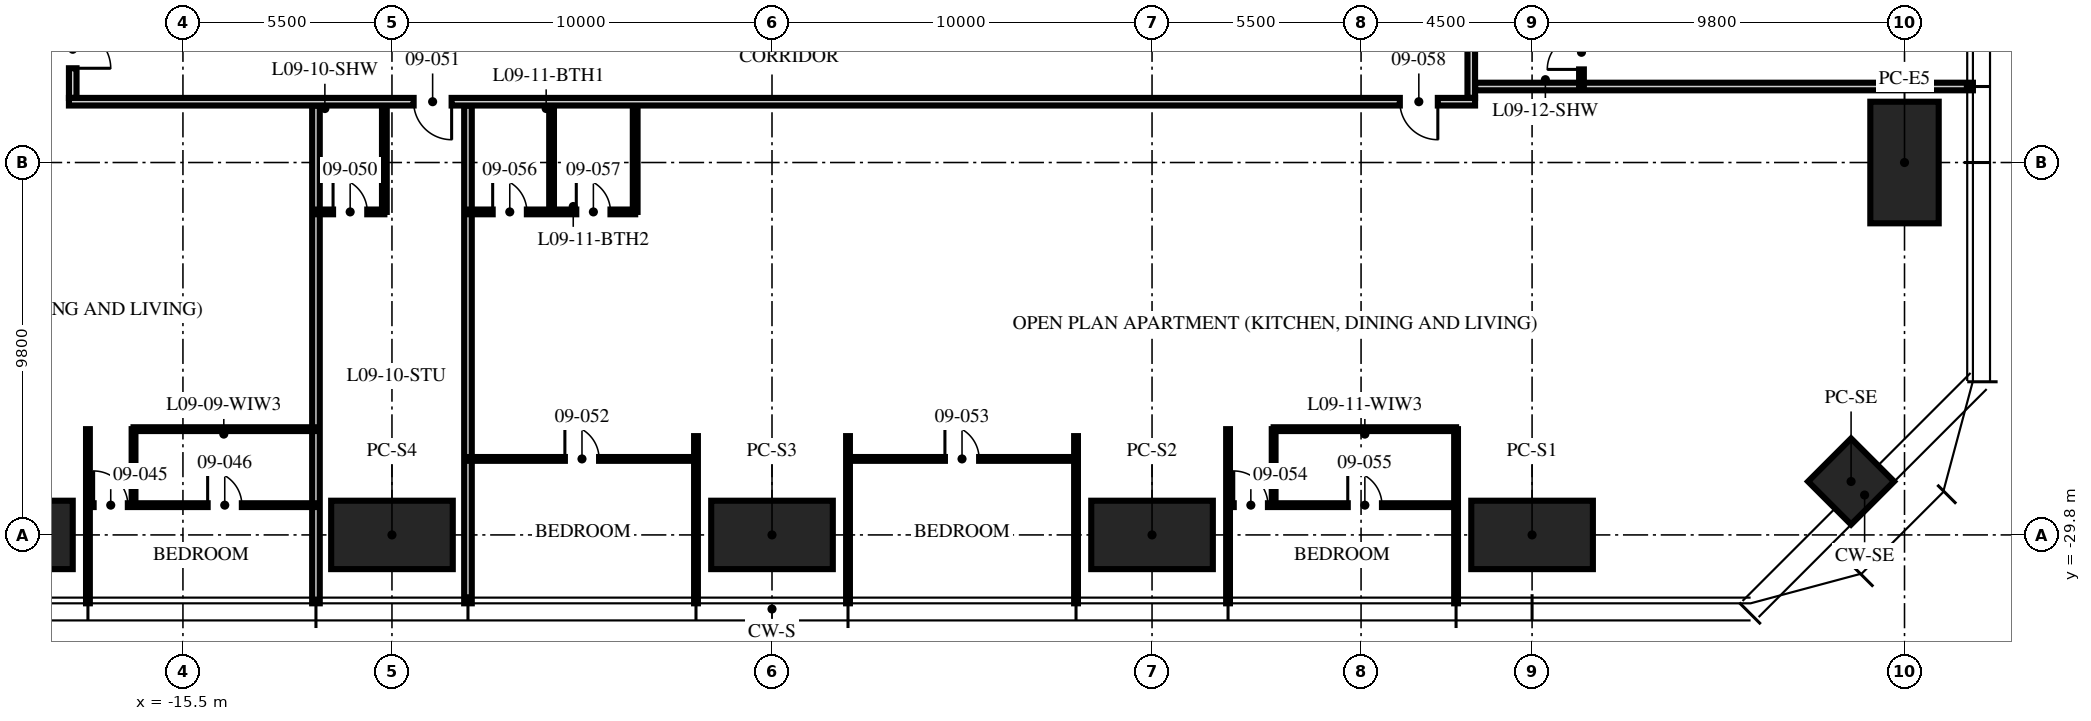
"""IFC4 building model, lengths in metres.
Left out: names, types, materials, properties, quantities, classifications, styles, units other than length and angle.
Written with IfcOpenShell. Run it as: python <this file> out.ifc"""

import sys

from ifc_helpers import new_model, si_unit, direction, frame, frame_2d, origin, origin_2d, place, context, subcontext, project, spatial, rectangle, hollow_rectangle, extrude, element, fill, save


model = new_model("IFC4")
c1 = context("Model", 3, precision=1e-05, world=origin(), true_north=direction((0.0, 1.0)))
c2 = subcontext(c1, "Body", "Model", "MODEL_VIEW")
j1 = project(units=[si_unit("LENGTHUNIT", "METRE"), si_unit("PLANEANGLEUNIT", "RADIAN")], contexts=[c1])
p1 = place(None, origin())
s1 = spatial("IfcSite", under=j1, at=p1, CompositionType="ELEMENT")
p2 = place(p1, origin())
s2 = spatial("IfcBuilding", under=s1, at=p2, CompositionType="ELEMENT")
p3 = place(p2, frame((0.0, 0.0, 39.75)))
s3 = spatial("IfcBuildingStorey", under=s2, at=p3, CompositionType="ELEMENT", Elevation=39.75)
for number, where, z_axis, x_axis in (
    (1, (29.8, -20.0, 0.0), (0.0, 0.0, 1.0), (0.0, 1.0, 0.0)),
    (2, (20.0, -29.8, 0.0), (0.0, 0.0, 1.0), (1.0, 0.0, 0.0)),
    (3, (10.0, -29.8, 0.0), (0.0, 0.0, 1.0), (1.0, 0.0, 0.0)),
    (4, (0.0, -29.8, 0.0), (0.0, 0.0, 1.0), (1.0, 0.0, 0.0)),
    (5, (-10.0, -29.8, 0.0), (0.0, 0.0, 1.0), (1.0, 0.0, 0.0)),
    (6, (-20.0, -29.8, 0.0), (0.0, 0.0, 1.0), (1.0, 0.0, 0.0)),
):
    element("IfcColumn", number, at=place(p3, frame(where, z_axis=z_axis, x_axis=x_axis)), inside=s3, PredefinedType="COLUMN", context=c2, shape_type="SweptSolid", body=[
        extrude(hollow_rectangle(XDim=3.2, YDim=1.8, WallThickness=0.2, at=origin_2d()), origin(), (0.0, 0.0, 1.0), 3.75),
    ])
p4 = place(p3, frame((28.394, -28.394, 0.0), z_axis=(0.0, 0.0, 1.0), x_axis=(0.707106781187, 0.707106781187, 0.0)))
e7 = element("IfcColumn", 7, at=p4, inside=s3, PredefinedType="COLUMN", context=c2, shape_type="SweptSolid", body=[
    extrude(hollow_rectangle(XDim=1.6, YDim=1.6, WallThickness=0.1, at=origin_2d()), origin(), (0.0, 0.0, 1.0), 3.75),
])
p5 = place(p3, frame((-18.0, -27.017, 0.0), z_axis=(0.0, 0.0, 1.0), x_axis=(0.0, -1.0, 0.0)))
e8 = element("IfcWall", 8, at=p5, inside=s3, PredefinedType="PARTITIONING", context=c2, shape_type="SweptSolid", body=[
    extrude(rectangle(XDim=4.583, YDim=0.1, at=frame_2d((2.292, 0.0))), origin(), (0.0, 0.0, 1.0), 2.71),
])
for number, where, z_axis, x_axis in (
    (9, (-12.0, -18.5, 0.0), (0.0, 0.0, 1.0), (0.0, -1.0, 0.0)),
    (10, (-8.0, -18.5, 0.0), (0.0, 0.0, 1.0), (0.0, -1.0, 0.0)),
):
    element("IfcWall", number, at=place(p3, frame(where, z_axis=z_axis, x_axis=x_axis)), inside=s3, PredefinedType="PARTITIONING", context=c2, shape_type="SweptSolid", body=[
        extrude(rectangle(XDim=13.1, YDim=0.2, at=frame_2d((6.55, 0.0))), origin(), (0.0, 0.0, 1.0), 2.71),
    ])
for number, where, z_axis, x_axis in (
    (11, (-2.0, -27.2, 0.0), (0.0, 0.0, 1.0), (0.0, -1.0, 0.0)),
    (12, (2.0, -27.2, 0.0), (0.0, 0.0, 1.0), (0.0, -1.0, 0.0)),
    (13, (8.0, -27.2, 0.0), (0.0, 0.0, 1.0), (0.0, -1.0, 0.0)),
):
    element("IfcWall", number, at=place(p3, frame(where, z_axis=z_axis, x_axis=x_axis)), inside=s3, PredefinedType="PARTITIONING", context=c2, shape_type="SweptSolid", body=[
        extrude(rectangle(XDim=4.4, YDim=0.1, at=frame_2d((2.2, 0.0))), origin(), (0.0, 0.0, 1.0), 2.71),
    ])
for number, where, z_axis, x_axis in (
    (14, (12.0, -27.017, 0.0), (0.0, 0.0, 1.0), (0.0, -1.0, 0.0)),
    (15, (18.0, -27.017, 0.0), (0.0, 0.0, 1.0), (0.0, -1.0, 0.0)),
):
    element("IfcWall", number, at=place(p3, frame(where, z_axis=z_axis, x_axis=x_axis)), inside=s3, PredefinedType="PARTITIONING", context=c2, shape_type="SweptSolid", body=[
        extrude(rectangle(XDim=4.583, YDim=0.1, at=frame_2d((2.292, 0.0))), origin(), (0.0, 0.0, 1.0), 2.71),
    ])
p6 = place(p3, frame((18.5, -18.0, 0.0), z_axis=(0.0, 0.0, 1.0), x_axis=(1.0, 0.0, 0.0)))
e16 = element("IfcWall", 16, at=p6, inside=s3, PredefinedType="PARTITIONING", context=c2, shape_type="SweptSolid", body=[
    extrude(rectangle(XDim=13.1, YDim=0.2, at=frame_2d((6.55, 0.0))), origin(), (0.0, 0.0, 1.0), 2.3),
])
p7 = place(p3, frame((-18.0, -29.017, 0.0), z_axis=(0.0, 0.0, 1.0), x_axis=(1.0, 0.0, 0.0)))
e17 = element("IfcWall", 17, at=p7, inside=s3, PredefinedType="PARTITIONING", context=c2, shape_type="SweptSolid", body=[
    extrude(rectangle(XDim=6.0, YDim=0.1, at=frame_2d((3.0, 0.0))), origin(), (0.0, 0.0, 1.0), 2.61),
])
p8 = place(p7, frame((0.15, 0.0, 0.0)))
e18 = element("IfcOpeningElement", 18, at=p8, cuts=e17, PredefinedType="OPENING", context=c2, shape_type="SweptSolid", body=[
    extrude(rectangle(XDim=0.9, YDim=2.1, at=frame_2d((0.45, 1.05))), frame((0.0, 0.06, 0.0), z_axis=(0.0, -1.0, 0.0), x_axis=(1.0, 0.0, 0.0)), (0.0, 0.0, 1.0), 0.12),
])
p9 = place(p7, frame((3.15, 0.0, 0.0)))
e19 = element("IfcOpeningElement", 19, at=p9, cuts=e17, PredefinedType="OPENING", context=c2, shape_type="SweptSolid", body=[
    extrude(rectangle(XDim=0.9, YDim=2.1, at=frame_2d((0.45, 1.05))), frame((0.0, 0.06, 0.0), z_axis=(0.0, -1.0, 0.0), x_axis=(1.0, 0.0, 0.0)), (0.0, 0.0, 1.0), 0.12),
])
p10 = place(p3, frame((-16.8, -27.017, 0.0), z_axis=(0.0, 0.0, 1.0), x_axis=(0.0, -1.0, 0.0)))
e20 = element("IfcWall", 20, at=p10, inside=s3, PredefinedType="PARTITIONING", context=c2, shape_type="SweptSolid", body=[
    extrude(rectangle(XDim=2.0, YDim=0.1, at=frame_2d((1.0, 0.0))), origin(), (0.0, 0.0, 1.0), 3.5),
])
p11 = place(p3, frame((-16.8, -27.017, 0.0), z_axis=(0.0, 0.0, 1.0), x_axis=(1.0, 0.0, 0.0)))
e21 = element("IfcWall", 21, at=p11, inside=s3, PredefinedType="PARTITIONING", context=c2, shape_type="SweptSolid", body=[
    extrude(rectangle(XDim=4.8, YDim=0.1, at=frame_2d((2.4, 0.0))), origin(), (0.0, 0.0, 1.0), 2.61),
])
p12 = place(p3, frame((-12.0, -21.3, 0.0), z_axis=(0.0, 0.0, 1.0), x_axis=(1.0, 0.0, 0.0)))
e22 = element("IfcWall", 22, at=p12, inside=s3, PredefinedType="PARTITIONING", context=c2, shape_type="SweptSolid", body=[
    extrude(rectangle(XDim=1.8, YDim=0.125, at=frame_2d((0.9, 0.0))), origin(), (0.0, 0.0, 1.0), 3.5),
])
p13 = place(p12, frame((0.45, 0.0, 0.0)))
e23 = element("IfcOpeningElement", 23, at=p13, cuts=e22, PredefinedType="OPENING", context=c2, shape_type="SweptSolid", body=[
    extrude(rectangle(XDim=0.9, YDim=2.1, at=frame_2d((0.45, 1.05))), frame((0.0, 0.073, 0.0), z_axis=(0.0, -1.0, 0.0), x_axis=(1.0, 0.0, 0.0)), (0.0, 0.0, 1.0), 0.145),
])
p14 = place(p3, frame((-10.2, -18.5, 0.0), z_axis=(0.0, 0.0, 1.0), x_axis=(0.0, -1.0, 0.0)))
e24 = element("IfcWall", 24, at=p14, inside=s3, PredefinedType="PARTITIONING", context=c2, shape_type="SweptSolid", body=[
    extrude(rectangle(XDim=2.8, YDim=0.125, at=frame_2d((1.4, 0.0))), origin(), (0.0, 0.0, 1.0), 2.492),
])
p15 = place(p3, frame((-8.0, -27.8, 0.0), z_axis=(0.0, 0.0, 1.0), x_axis=(1.0, 0.0, 0.0)))
e25 = element("IfcWall", 25, at=p15, inside=s3, PredefinedType="PARTITIONING", context=c2, shape_type="SweptSolid", body=[
    extrude(rectangle(XDim=6.0, YDim=0.1, at=frame_2d((3.0, 0.0))), origin(), (0.0, 0.0, 1.0), 2.61),
])
p16 = place(p15, frame((2.55, 0.0, 0.0)))
e26 = element("IfcOpeningElement", 26, at=p16, cuts=e25, PredefinedType="OPENING", context=c2, shape_type="SweptSolid", body=[
    extrude(rectangle(XDim=0.9, YDim=2.1, at=frame_2d((0.45, 1.05))), frame((0.0, 0.06, 0.0), z_axis=(0.0, -1.0, 0.0), x_axis=(1.0, 0.0, 0.0)), (0.0, 0.0, 1.0), 0.12),
])
p17 = place(p3, frame((2.0, -27.8, 0.0), z_axis=(0.0, 0.0, 1.0), x_axis=(1.0, 0.0, 0.0)))
e27 = element("IfcWall", 27, at=p17, inside=s3, PredefinedType="PARTITIONING", context=c2, shape_type="SweptSolid", body=[
    extrude(rectangle(XDim=6.0, YDim=0.1, at=frame_2d((3.0, 0.0))), origin(), (0.0, 0.0, 1.0), 2.61),
])
p18 = place(p17, frame((2.55, 0.0, 0.0)))
e28 = element("IfcOpeningElement", 28, at=p18, cuts=e27, PredefinedType="OPENING", context=c2, shape_type="SweptSolid", body=[
    extrude(rectangle(XDim=0.9, YDim=2.1, at=frame_2d((0.45, 1.05))), frame((0.0, 0.06, 0.0), z_axis=(0.0, -1.0, 0.0), x_axis=(1.0, 0.0, 0.0)), (0.0, 0.0, 1.0), 0.12),
])
p19 = place(p3, frame((12.0, -29.017, 0.0), z_axis=(0.0, 0.0, 1.0), x_axis=(1.0, 0.0, 0.0)))
e29 = element("IfcWall", 29, at=p19, inside=s3, PredefinedType="PARTITIONING", context=c2, shape_type="SweptSolid", body=[
    extrude(rectangle(XDim=6.0, YDim=0.1, at=frame_2d((3.0, 0.0))), origin(), (0.0, 0.0, 1.0), 2.61),
])
p20 = place(p19, frame((0.15, 0.0, 0.0)))
e30 = element("IfcOpeningElement", 30, at=p20, cuts=e29, PredefinedType="OPENING", context=c2, shape_type="SweptSolid", body=[
    extrude(rectangle(XDim=0.9, YDim=2.1, at=frame_2d((0.45, 1.05))), frame((0.0, 0.06, 0.0), z_axis=(0.0, -1.0, 0.0), x_axis=(1.0, 0.0, 0.0)), (0.0, 0.0, 1.0), 0.12),
])
p21 = place(p19, frame((3.15, 0.0, 0.0)))
e31 = element("IfcOpeningElement", 31, at=p21, cuts=e29, PredefinedType="OPENING", context=c2, shape_type="SweptSolid", body=[
    extrude(rectangle(XDim=0.9, YDim=2.1, at=frame_2d((0.45, 1.05))), frame((0.0, 0.06, 0.0), z_axis=(0.0, -1.0, 0.0), x_axis=(1.0, 0.0, 0.0)), (0.0, 0.0, 1.0), 0.12),
])
p22 = place(p3, frame((13.2, -27.017, 0.0), z_axis=(0.0, 0.0, 1.0), x_axis=(0.0, -1.0, 0.0)))
e32 = element("IfcWall", 32, at=p22, inside=s3, PredefinedType="PARTITIONING", context=c2, shape_type="SweptSolid", body=[
    extrude(rectangle(XDim=2.0, YDim=0.1, at=frame_2d((1.0, 0.0))), origin(), (0.0, 0.0, 1.0), 3.5),
])
p23 = place(p3, frame((13.2, -27.017, 0.0), z_axis=(0.0, 0.0, 1.0), x_axis=(1.0, 0.0, 0.0)))
e33 = element("IfcWall", 33, at=p23, inside=s3, PredefinedType="PARTITIONING", context=c2, shape_type="SweptSolid", body=[
    extrude(rectangle(XDim=4.8, YDim=0.1, at=frame_2d((2.4, 0.0))), origin(), (0.0, 0.0, 1.0), 2.61),
])
p24 = place(p3, frame((-8.0, -21.3, 0.0), z_axis=(0.0, 0.0, 1.0), x_axis=(1.0, 0.0, 0.0)))
e34 = element("IfcWall", 34, at=p24, inside=s3, PredefinedType="PARTITIONING", context=c2, shape_type="SweptSolid", body=[
    extrude(rectangle(XDim=4.4, YDim=0.125, at=frame_2d((2.2, 0.0))), origin(), (0.0, 0.0, 1.0), 2.61),
])
p25 = place(p24, frame((0.65, 0.0, 0.0)))
e35 = element("IfcOpeningElement", 35, at=p25, cuts=e34, PredefinedType="OPENING", context=c2, shape_type="SweptSolid", body=[
    extrude(rectangle(XDim=0.9, YDim=2.1, at=frame_2d((0.45, 1.05))), frame((0.0, 0.073, 0.0), z_axis=(0.0, -1.0, 0.0), x_axis=(1.0, 0.0, 0.0)), (0.0, 0.0, 1.0), 0.145),
])
p26 = place(p24, frame((2.85, 0.0, 0.0)))
e36 = element("IfcOpeningElement", 36, at=p26, cuts=e34, PredefinedType="OPENING", context=c2, shape_type="SweptSolid", body=[
    extrude(rectangle(XDim=0.9, YDim=2.1, at=frame_2d((0.45, 1.05))), frame((0.0, 0.073, 0.0), z_axis=(0.0, -1.0, 0.0), x_axis=(1.0, 0.0, 0.0)), (0.0, 0.0, 1.0), 0.145),
])
for number, where, z_axis, x_axis in (
    (37, (-5.8, -18.5, 0.0), (0.0, 0.0, 1.0), (0.0, -1.0, 0.0)),
    (38, (-3.6, -18.5, 0.0), (0.0, 0.0, 1.0), (0.0, -1.0, 0.0)),
):
    element("IfcWall", number, at=place(p3, frame(where, z_axis=z_axis, x_axis=x_axis)), inside=s3, PredefinedType="PARTITIONING", context=c2, shape_type="SweptSolid", body=[
        extrude(rectangle(XDim=2.8, YDim=0.125, at=frame_2d((1.4, 0.0))), origin(), (0.0, 0.0, 1.0), 3.5),
    ])
p27 = place(p3, frame((21.3, -18.0, 0.0), z_axis=(0.0, 0.0, 1.0), x_axis=(0.0, 1.0, 0.0)))
e39 = element("IfcWall", 39, at=p27, inside=s3, PredefinedType="PARTITIONING", context=c2, shape_type="SweptSolid", body=[
    extrude(rectangle(XDim=1.8, YDim=0.125, at=frame_2d((0.9, 0.0))), origin(), (0.0, 0.0, 1.0), 3.5),
])
p28 = place(p27, frame((0.45, 0.0, 0.0)))
e40 = element("IfcOpeningElement", 40, at=p28, cuts=e39, PredefinedType="OPENING", context=c2, shape_type="SweptSolid", body=[
    extrude(rectangle(XDim=0.9, YDim=2.1, at=frame_2d((0.45, 1.05))), frame((0.0, 0.073, 0.0), z_axis=(0.0, -1.0, 0.0), x_axis=(1.0, 0.0, 0.0)), (0.0, 0.0, 1.0), 0.145),
])
p29 = place(p3, frame((18.4, -18.3, 0.0), z_axis=(0.0, 0.0, 1.0), x_axis=(0.0, 1.0, 0.0)))
e41 = element("IfcWall", 41, at=p29, inside=s3, PredefinedType="PARTITIONING", context=c2, shape_type="SweptSolid", body=[
    extrude(rectangle(XDim=14.3, YDim=0.2, at=frame_2d((7.15, 0.0))), origin(), (0.0, 0.0, 1.0), 2.3),
])
p30 = place(p29, frame((4.87, 0.0, 0.0)))
e42 = element("IfcOpeningElement", 42, at=p30, cuts=e41, PredefinedType="OPENING", context=c2, shape_type="SweptSolid", body=[
    extrude(rectangle(XDim=1.0, YDim=2.2, at=frame_2d((0.5, 1.1))), frame((0.0, 0.11, 0.0), z_axis=(0.0, -1.0, 0.0), x_axis=(1.0, 0.0, 0.0)), (0.0, 0.0, 1.0), 0.22),
])
p31 = place(p29, frame((8.87, 0.0, 0.0)))
e43 = element("IfcOpeningElement", 43, at=p31, cuts=e41, PredefinedType="OPENING", context=c2, shape_type="SweptSolid", body=[
    extrude(rectangle(XDim=1.0, YDim=2.2, at=frame_2d((0.5, 1.1))), frame((0.0, 0.11, 0.0), z_axis=(0.0, -1.0, 0.0), x_axis=(1.0, 0.0, 0.0)), (0.0, 0.0, 1.0), 0.22),
])
p32 = place(p3, frame((-18.4, 18.3, 0.0), z_axis=(0.0, 0.0, 1.0), x_axis=(0.0, -1.0, 0.0)))
e44 = element("IfcWall", 44, at=p32, inside=s3, PredefinedType="PARTITIONING", context=c2, shape_type="SweptSolid", body=[
    extrude(rectangle(XDim=36.6, YDim=0.2, at=frame_2d((18.3, 0.0))), origin(), (0.0, 0.0, 1.0), 2.3),
])
p33 = place(p32, frame((8.7, 0.0, 0.0)))
e45 = element("IfcOpeningElement", 45, at=p33, cuts=e44, PredefinedType="OPENING", context=c2, shape_type="SweptSolid", body=[
    extrude(rectangle(XDim=1.0, YDim=2.2, at=frame_2d((0.5, 1.1))), frame((0.0, 0.11, 0.0), z_axis=(0.0, -1.0, 0.0), x_axis=(1.0, 0.0, 0.0)), (0.0, 0.0, 1.0), 0.22),
])
p34 = place(p32, frame((14.87, 0.0, 0.0)))
e46 = element("IfcOpeningElement", 46, at=p34, cuts=e44, PredefinedType="OPENING", context=c2, shape_type="SweptSolid", body=[
    extrude(rectangle(XDim=1.0, YDim=2.2, at=frame_2d((0.5, 1.1))), frame((0.0, 0.11, 0.0), z_axis=(0.0, -1.0, 0.0), x_axis=(1.0, 0.0, 0.0)), (0.0, 0.0, 1.0), 0.22),
])
p35 = place(p32, frame((34.82, 0.0, 0.0)))
e47 = element("IfcOpeningElement", 47, at=p35, cuts=e44, PredefinedType="OPENING", context=c2, shape_type="SweptSolid", body=[
    extrude(rectangle(XDim=1.0, YDim=2.2, at=frame_2d((0.5, 1.1))), frame((0.0, 0.11, 0.0), z_axis=(0.0, -1.0, 0.0), x_axis=(1.0, 0.0, 0.0)), (0.0, 0.0, 1.0), 0.22),
])
p36 = place(p3, frame((18.5, -18.4, 0.0), z_axis=(0.0, 0.0, 1.0), x_axis=(-1.0, 0.0, 0.0)))
e48 = element("IfcWall", 48, at=p36, inside=s3, PredefinedType="PARTITIONING", context=c2, shape_type="SweptSolid", body=[
    extrude(rectangle(XDim=37.0, YDim=0.2, at=frame_2d((18.5, 0.0))), origin(), (0.0, 0.0, 1.0), 2.3),
])
p37 = place(p36, frame((26.93, 0.0, 0.0)))
e49 = element("IfcOpeningElement", 49, at=p37, cuts=e48, PredefinedType="OPENING", context=c2, shape_type="SweptSolid", body=[
    extrude(rectangle(XDim=1.0, YDim=2.2, at=frame_2d((0.5, 1.1))), frame((0.0, 0.11, 0.0), z_axis=(0.0, -1.0, 0.0), x_axis=(1.0, 0.0, 0.0)), (0.0, 0.0, 1.0), 0.22),
])
p38 = place(p36, frame((0.98, 0.0, 0.0)))
e50 = element("IfcOpeningElement", 50, at=p38, cuts=e48, PredefinedType="OPENING", context=c2, shape_type="SweptSolid", body=[
    extrude(rectangle(XDim=1.0, YDim=2.2, at=frame_2d((0.5, 1.1))), frame((0.0, 0.11, 0.0), z_axis=(0.0, -1.0, 0.0), x_axis=(1.0, 0.0, 0.0)), (0.0, 0.0, 1.0), 0.22),
])
p39 = place(p8, origin())
e51 = element("IfcDoor", 51, at=p39, inside=s3, OperationType="SINGLE_SWING_LEFT", PredefinedType="DOOR", context=c2, shape_type="SweptSolid", body=[
    extrude(rectangle(XDim=0.9, YDim=2.1, at=frame_2d((0.45, 1.05))), frame((0.0, 0.025, 0.0), z_axis=(0.0, -1.0, 0.0), x_axis=(1.0, 0.0, 0.0)), (0.0, 0.0, 1.0), 0.05),
])
fill(e18, e51)
p40 = place(p9, origin())
e52 = element("IfcDoor", 52, at=p40, inside=s3, OperationType="SINGLE_SWING_LEFT", PredefinedType="DOOR", context=c2, shape_type="SweptSolid", body=[
    extrude(rectangle(XDim=0.9, YDim=2.1, at=frame_2d((0.45, 1.05))), frame((0.0, 0.025, 0.0), z_axis=(0.0, -1.0, 0.0), x_axis=(1.0, 0.0, 0.0)), (0.0, 0.0, 1.0), 0.05),
])
fill(e19, e52)
p41 = place(p35, origin())
e53 = element("IfcDoor", 53, at=p41, inside=s3, OperationType="SINGLE_SWING_RIGHT", PredefinedType="DOOR", context=c2, shape_type="SweptSolid", body=[
    extrude(rectangle(XDim=1.0, YDim=2.2, at=frame_2d((0.5, 1.1))), frame((0.0, 0.025, 0.0), z_axis=(0.0, -1.0, 0.0), x_axis=(1.0, 0.0, 0.0)), (0.0, 0.0, 1.0), 0.05),
])
fill(e47, e53)
p42 = place(p13, origin())
e54 = element("IfcDoor", 54, at=p42, inside=s3, OperationType="SINGLE_SWING_LEFT", PredefinedType="DOOR", context=c2, shape_type="SweptSolid", body=[
    extrude(rectangle(XDim=0.9, YDim=2.1, at=frame_2d((0.45, 1.05))), frame((0.0, 0.025, 0.0), z_axis=(0.0, -1.0, 0.0), x_axis=(1.0, 0.0, 0.0)), (0.0, 0.0, 1.0), 0.05),
])
fill(e23, e54)
p43 = place(p37, origin())
e55 = element("IfcDoor", 55, at=p43, inside=s3, OperationType="SINGLE_SWING_LEFT", PredefinedType="DOOR", context=c2, shape_type="SweptSolid", body=[
    extrude(rectangle(XDim=1.0, YDim=2.2, at=frame_2d((0.5, 1.1))), frame((0.0, 0.025, 0.0), z_axis=(0.0, -1.0, 0.0), x_axis=(1.0, 0.0, 0.0)), (0.0, 0.0, 1.0), 0.05),
])
fill(e49, e55)
p44 = place(p16, origin())
e56 = element("IfcDoor", 56, at=p44, inside=s3, OperationType="SINGLE_SWING_LEFT", PredefinedType="DOOR", context=c2, shape_type="SweptSolid", body=[
    extrude(rectangle(XDim=0.9, YDim=2.1, at=frame_2d((0.45, 1.05))), frame((0.0, 0.025, 0.0), z_axis=(0.0, -1.0, 0.0), x_axis=(1.0, 0.0, 0.0)), (0.0, 0.0, 1.0), 0.05),
])
fill(e26, e56)
p45 = place(p18, origin())
e57 = element("IfcDoor", 57, at=p45, inside=s3, OperationType="SINGLE_SWING_LEFT", PredefinedType="DOOR", context=c2, shape_type="SweptSolid", body=[
    extrude(rectangle(XDim=0.9, YDim=2.1, at=frame_2d((0.45, 1.05))), frame((0.0, 0.025, 0.0), z_axis=(0.0, -1.0, 0.0), x_axis=(1.0, 0.0, 0.0)), (0.0, 0.0, 1.0), 0.05),
])
fill(e28, e57)
p46 = place(p20, origin())
e58 = element("IfcDoor", 58, at=p46, inside=s3, OperationType="SINGLE_SWING_LEFT", PredefinedType="DOOR", context=c2, shape_type="SweptSolid", body=[
    extrude(rectangle(XDim=0.9, YDim=2.1, at=frame_2d((0.45, 1.05))), frame((0.0, 0.025, 0.0), z_axis=(0.0, -1.0, 0.0), x_axis=(1.0, 0.0, 0.0)), (0.0, 0.0, 1.0), 0.05),
])
fill(e30, e58)
p47 = place(p21, origin())
e59 = element("IfcDoor", 59, at=p47, inside=s3, OperationType="SINGLE_SWING_LEFT", PredefinedType="DOOR", context=c2, shape_type="SweptSolid", body=[
    extrude(rectangle(XDim=0.9, YDim=2.1, at=frame_2d((0.45, 1.05))), frame((0.0, 0.025, 0.0), z_axis=(0.0, -1.0, 0.0), x_axis=(1.0, 0.0, 0.0)), (0.0, 0.0, 1.0), 0.05),
])
fill(e31, e59)
p48 = place(p25, origin())
e60 = element("IfcDoor", 60, at=p48, inside=s3, OperationType="SINGLE_SWING_LEFT", PredefinedType="DOOR", context=c2, shape_type="SweptSolid", body=[
    extrude(rectangle(XDim=0.9, YDim=2.1, at=frame_2d((0.45, 1.05))), frame((0.0, 0.025, 0.0), z_axis=(0.0, -1.0, 0.0), x_axis=(1.0, 0.0, 0.0)), (0.0, 0.0, 1.0), 0.05),
])
fill(e35, e60)
p49 = place(p26, origin())
e61 = element("IfcDoor", 61, at=p49, inside=s3, OperationType="SINGLE_SWING_LEFT", PredefinedType="DOOR", context=c2, shape_type="SweptSolid", body=[
    extrude(rectangle(XDim=0.9, YDim=2.1, at=frame_2d((0.45, 1.05))), frame((0.0, 0.025, 0.0), z_axis=(0.0, -1.0, 0.0), x_axis=(1.0, 0.0, 0.0)), (0.0, 0.0, 1.0), 0.05),
])
fill(e36, e61)
p50 = place(p38, origin())
e62 = element("IfcDoor", 62, at=p50, inside=s3, OperationType="SINGLE_SWING_LEFT", PredefinedType="DOOR", context=c2, shape_type="SweptSolid", body=[
    extrude(rectangle(XDim=1.0, YDim=2.2, at=frame_2d((0.5, 1.1))), frame((0.0, 0.025, 0.0), z_axis=(0.0, -1.0, 0.0), x_axis=(1.0, 0.0, 0.0)), (0.0, 0.0, 1.0), 0.05),
])
fill(e50, e62)
p51 = place(p28, origin())
e63 = element("IfcDoor", 63, at=p51, inside=s3, OperationType="SINGLE_SWING_LEFT", PredefinedType="DOOR", context=c2, shape_type="SweptSolid", body=[
    extrude(rectangle(XDim=0.9, YDim=2.1, at=frame_2d((0.45, 1.05))), frame((0.0, 0.025, 0.0), z_axis=(0.0, -1.0, 0.0), x_axis=(1.0, 0.0, 0.0)), (0.0, 0.0, 1.0), 0.05),
])
fill(e40, e63)
save(model, sys.argv[1])
